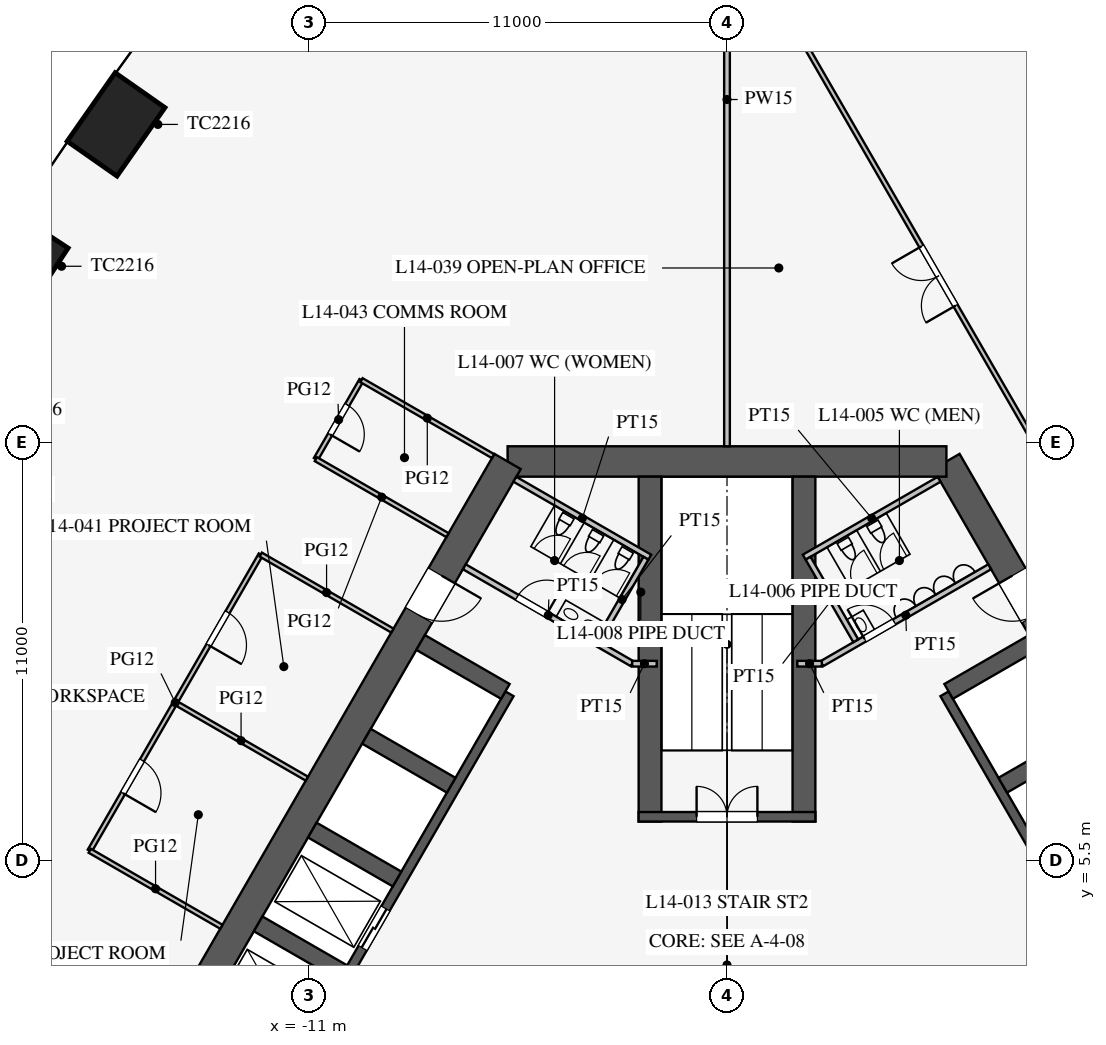
"""IFC4 building model, lengths in metres.
Left out: names, types, materials, properties, quantities, classifications, styles, units other than length and angle.
Written with IfcOpenShell. Run it as: python <this file> out.ifc"""

import sys

from ifc_helpers import new_model, si_unit, direction, frame, frame_2d, origin, origin_2d, place, context, subcontext, project, spatial, rectangle, extrude, element, fill, save


model = new_model("IFC4")
c1 = context("Model", 3, precision=1e-05, world=origin(), true_north=direction((0.0, 1.0)))
c2 = subcontext(c1, "Body", "Model", "MODEL_VIEW")
j1 = project(units=[si_unit("LENGTHUNIT", "METRE"), si_unit("PLANEANGLEUNIT", "RADIAN")], contexts=[c1])
p1 = place(None, origin())
s1 = spatial("IfcSite", under=j1, at=p1, CompositionType="ELEMENT")
p2 = place(p1, origin())
s2 = spatial("IfcBuilding", under=s1, at=p2, CompositionType="ELEMENT")
p3 = place(p2, frame((0.0, 0.0, 62.7)))
s3 = spatial("IfcBuildingStorey", under=s2, at=p3, CompositionType="ELEMENT", Elevation=62.7)
for number, where, z_axis, x_axis in (
    (1, (-16.076, 24.87, 0.0), (0.0, 0.0, 1.0), (-0.574, -0.819, 0.0)),
    (2, (-18.611, 21.137, 0.0), (0.0, 0.0, 1.0), (-0.549, -0.836, 0.0)),
):
    element("IfcColumn", number, at=place(p3, frame(where, z_axis=z_axis, x_axis=x_axis)), inside=s3, PredefinedType="COLUMN", context=c2, shape_type="SweptSolid", body=[
        extrude(rectangle(XDim=2.2, YDim=1.6, at=origin_2d()), origin(), (0.0, 0.0, 1.0), 4.2),
    ])
p4 = place(p3, frame((16.743, -3.0, 0.0), z_axis=(0.0, 0.0, 1.0), x_axis=(-0.500002442456, 0.866023993627, 0.0)))
e3 = element("IfcWall", 3, at=p4, inside=s3, PredefinedType="SHEAR", context=c2, shape_type="SweptSolid", body=[
    extrude(rectangle(XDim=21.939, YDim=0.8, at=frame_2d((10.97, 0.0))), origin(), (0.0, 0.0, 1.0), 4.2),
])
p5 = place(p4, frame((17.27, 0.0, 0.0)))
e4 = element("IfcOpeningElement", 4, at=p5, cuts=e3, PredefinedType="OPENING", context=c2, shape_type="SweptSolid", body=[
    extrude(rectangle(XDim=1.2, YDim=2.1, at=frame_2d((0.6, 1.05))), frame((0.0, 0.41, 0.0), z_axis=(0.0, -1.0, 0.0), x_axis=(1.0, 0.0, 0.0)), (0.0, 0.0, 1.0), 0.82),
])
p6 = place(p4, frame((3.47, 0.0, 0.0)))
e5 = element("IfcOpeningElement", 5, at=p6, cuts=e3, PredefinedType="OPENING", context=c2, shape_type="SweptSolid", body=[
    extrude(rectangle(XDim=1.2, YDim=2.1, at=frame_2d((0.6, 1.05))), frame((0.0, 0.41, 0.0), z_axis=(0.0, -1.0, 0.0), x_axis=(1.0, 0.0, 0.0)), (0.0, 0.0, 1.0), 0.82),
])
p7 = place(p3, frame((5.773, 16.0, 0.0), z_axis=(0.0, 0.0, 1.0), x_axis=(-1.0, 0.0, 0.0)))
e6 = element("IfcWall", 6, at=p7, inside=s3, PredefinedType="SHEAR", context=c2, shape_type="SweptSolid", body=[
    extrude(rectangle(XDim=11.547, YDim=0.8, at=frame_2d((5.773, 0.0))), origin(), (0.0, 0.0, 1.0), 4.2),
])
p8 = place(p3, frame((-5.773, 16.0, 0.0), z_axis=(0.0, 0.0, 1.0), x_axis=(-0.500002442456, -0.866023993627, 0.0)))
e7 = element("IfcWall", 7, at=p8, inside=s3, PredefinedType="SHEAR", context=c2, shape_type="SweptSolid", body=[
    extrude(rectangle(XDim=21.939, YDim=0.8, at=frame_2d((10.97, 0.0))), origin(), (0.0, 0.0, 1.0), 4.2),
])
p9 = place(p8, frame((17.27, 0.0, 0.0)))
e8 = element("IfcOpeningElement", 8, at=p9, cuts=e7, PredefinedType="OPENING", context=c2, shape_type="SweptSolid", body=[
    extrude(rectangle(XDim=1.2, YDim=2.1, at=frame_2d((0.6, 1.05))), frame((0.0, 0.41, 0.0), z_axis=(0.0, -1.0, 0.0), x_axis=(1.0, 0.0, 0.0)), (0.0, 0.0, 1.0), 0.82),
])
p10 = place(p8, frame((3.47, 0.0, 0.0)))
e9 = element("IfcOpeningElement", 9, at=p10, cuts=e7, PredefinedType="OPENING", context=c2, shape_type="SweptSolid", body=[
    extrude(rectangle(XDim=1.2, YDim=2.1, at=frame_2d((0.6, 1.05))), frame((0.0, 0.41, 0.0), z_axis=(0.0, -1.0, 0.0), x_axis=(1.0, 0.0, 0.0)), (0.0, 0.0, 1.0), 0.82),
])
p11 = place(p3, frame((11.424, 0.014, 0.0), z_axis=(0.0, 0.0, 1.0), x_axis=(-0.500001763848, 0.866024385424, 0.0)))
e10 = element("IfcWall", 10, at=p11, inside=s3, PredefinedType="SHEAR", context=c2, shape_type="SweptSolid", body=[
    extrude(rectangle(XDim=11.4, YDim=0.25, at=frame_2d((5.7, 0.0))), origin(), (0.0, 0.0, 1.0), 4.2),
])
p12 = place(p3, frame((7.257, 7.481, 0.0), z_axis=(0.0, 0.0, 1.0), x_axis=(0.866046643894, 0.499963209246, 0.0)))
e11 = element("IfcWall", 11, at=p12, inside=s3, PredefinedType="SHEAR", context=c2, shape_type="SweptSolid", body=[
    extrude(rectangle(XDim=2.575, YDim=0.45, at=frame_2d((1.288, 0.0))), origin(), (0.0, 0.0, 1.0), 4.2),
])
p13 = place(p3, frame((5.832, 9.949, 0.0), z_axis=(0.0, 0.0, 1.0), x_axis=(0.866029291668, 0.499993265928, 0.0)))
e12 = element("IfcWall", 12, at=p13, inside=s3, PredefinedType="SHEAR", context=c2, shape_type="SweptSolid", body=[
    extrude(rectangle(XDim=2.575, YDim=0.45, at=frame_2d((1.288, 0.0))), origin(), (0.0, 0.0, 1.0), 4.2),
])
p14 = place(p3, frame((-5.724, 9.886, 0.0), z_axis=(0.0, 0.0, 1.0), x_axis=(-0.500001763848, -0.866024385424, 0.0)))
e13 = element("IfcWall", 13, at=p14, inside=s3, PredefinedType="SHEAR", context=c2, shape_type="SweptSolid", body=[
    extrude(rectangle(XDim=11.4, YDim=0.25, at=frame_2d((5.7, 0.0))), origin(), (0.0, 0.0, 1.0), 4.2),
])
p15 = place(p14, frame((6.525, 0.0, 0.0)))
e14 = element("IfcOpeningElement", 14, at=p15, cuts=e13, PredefinedType="OPENING", context=c2, shape_type="SweptSolid", body=[
    extrude(rectangle(XDim=1.2, YDim=2.2, at=frame_2d((0.6, 1.1))), frame((0.0, 0.135, 0.0), z_axis=(0.0, -1.0, 0.0), x_axis=(1.0, 0.0, 0.0)), (0.0, 0.0, 1.0), 0.27),
])
p16 = place(p14, frame((9.375, 0.0, 0.0)))
e15 = element("IfcOpeningElement", 15, at=p16, cuts=e13, PredefinedType="OPENING", context=c2, shape_type="SweptSolid", body=[
    extrude(rectangle(XDim=1.2, YDim=2.2, at=frame_2d((0.6, 1.1))), frame((0.0, 0.135, 0.0), z_axis=(0.0, -1.0, 0.0), x_axis=(1.0, 0.0, 0.0)), (0.0, 0.0, 1.0), 0.27),
])
p17 = place(p3, frame((-5.832, 9.949, 0.0), z_axis=(0.0, 0.0, 1.0), x_axis=(-0.866029291668, 0.499993265928, 0.0)))
e16 = element("IfcWall", 16, at=p17, inside=s3, PredefinedType="SHEAR", context=c2, shape_type="SweptSolid", body=[
    extrude(rectangle(XDim=2.575, YDim=0.45, at=frame_2d((1.288, 0.0))), origin(), (0.0, 0.0, 1.0), 4.2),
])
for number, where, z_axis, x_axis in (
    (17, (-7.257, 7.481, 0.0), (0.0, 0.0, 1.0), (-0.866, 0.5, 0.0)),
    (18, (-8.682, 5.012, 0.0), (0.0, 0.0, 1.0), (-0.866, 0.5, 0.0)),
    (19, (-10.107, 2.544, 0.0), (0.0, 0.0, 1.0), (-0.866, 0.5, 0.0)),
):
    element("IfcWall", number, at=place(p3, frame(where, z_axis=z_axis, x_axis=x_axis)), inside=s3, PredefinedType="SHEAR", context=c2, shape_type="SweptSolid", body=[
        extrude(rectangle(XDim=2.575, YDim=0.45, at=frame_2d((1.288, 0.0))), origin(), (0.0, 0.0, 1.0), 4.2),
    ])
for number, where, z_axis, x_axis in (
    (20, (2.025, 6.525, 0.0), (0.0, 0.0, 1.0), (0.0, 1.0, 0.0)),
    (21, (-2.025, 6.525, 0.0), (0.0, 0.0, 1.0), (0.0, 1.0, 0.0)),
):
    element("IfcWall", number, at=place(p3, frame(where, z_axis=z_axis, x_axis=x_axis)), inside=s3, PredefinedType="SHEAR", context=c2, shape_type="SweptSolid", body=[
        extrude(rectangle(XDim=9.075, YDim=0.6, at=frame_2d((4.538, 0.0))), origin(), (0.0, 0.0, 1.0), 4.2),
    ])
p18 = place(p3, frame((2.325, 6.65, 0.0), z_axis=(0.0, 0.0, 1.0), x_axis=(-1.0, 0.0, 0.0)))
e22 = element("IfcWall", 22, at=p18, inside=s3, PredefinedType="SHEAR", context=c2, shape_type="SweptSolid", body=[
    extrude(rectangle(XDim=4.65, YDim=0.25, at=frame_2d((2.325, 0.0))), origin(), (0.0, 0.0, 1.0), 4.2),
])
p19 = place(p18, frame((1.525, 0.0, 0.0)))
e23 = element("IfcOpeningElement", 23, at=p19, cuts=e22, PredefinedType="OPENING", context=c2, shape_type="SweptSolid", body=[
    extrude(rectangle(XDim=1.6, YDim=2.1, at=frame_2d((0.8, 1.05))), frame((0.0, 0.135, 0.0), z_axis=(0.0, -1.0, 0.0), x_axis=(1.0, 0.0, 0.0)), (0.0, 0.0, 1.0), 0.27),
])
p20 = place(p3, frame((2.495, 10.678, 0.0), z_axis=(0.0, 0.0, 1.0), x_axis=(0.86602216432, 0.500005610874, 0.0)))
e24 = element("IfcWall", 24, at=p20, inside=s3, PredefinedType="PARTITIONING", context=c2, shape_type="SweptSolid", body=[
    extrude(rectangle(XDim=5.1, YDim=0.15, at=frame_2d((2.55, 0.0))), origin(), (0.0, 0.0, 1.0), 4.0),
])
p21 = place(p20, frame((1.3, 0.0, 0.0)))
e25 = element("IfcOpeningElement", 25, at=p21, cuts=e24, PredefinedType="OPENING", context=c2, shape_type="SweptSolid", body=[
    extrude(rectangle(XDim=0.9, YDim=2.1, at=frame_2d((0.45, 1.05))), frame((0.0, 0.085, 0.0), z_axis=(0.0, -1.0, 0.0), x_axis=(1.0, 0.0, 0.0)), (0.0, 0.0, 1.0), 0.17),
])
p22 = place(p3, frame((-2.495, 10.678, 0.0), z_axis=(0.0, 0.0, 1.0), x_axis=(-0.86602216432, 0.500005610874, 0.0)))
e26 = element("IfcWall", 26, at=p22, inside=s3, PredefinedType="PARTITIONING", context=c2, shape_type="SweptSolid", body=[
    extrude(rectangle(XDim=5.1, YDim=0.15, at=frame_2d((2.55, 0.0))), origin(), (0.0, 0.0, 1.0), 4.0),
])
p23 = place(p22, frame((2.6, 0.0, 0.0)))
e27 = element("IfcOpeningElement", 27, at=p23, cuts=e26, PredefinedType="OPENING", context=c2, shape_type="SweptSolid", body=[
    extrude(rectangle(XDim=0.9, YDim=2.1, at=frame_2d((0.45, 1.05))), frame((0.0, 0.085, 0.0), z_axis=(0.0, -1.0, 0.0), x_axis=(1.0, 0.0, 0.0)), (0.0, 0.0, 1.0), 0.17),
])
for number, where, z_axis, x_axis in (
    (28, (2.495, 10.678, 0.0), (0.0, 0.0, 1.0), (-1.0, 0.0, 0.0)),
    (29, (-2.495, 10.678, 0.0), (0.0, 0.0, 1.0), (1.0, 0.0, 0.0)),
):
    element("IfcWall", number, at=place(p3, frame(where, z_axis=z_axis, x_axis=x_axis)), inside=s3, PredefinedType="PARTITIONING", context=c2, shape_type="SweptSolid", body=[
        extrude(rectangle(XDim=0.645, YDim=0.15, at=frame_2d((0.323, 0.0))), origin(), (0.0, 0.0, 1.0), 4.0),
    ])
p24 = place(p3, frame((2.031, 13.482, 0.0), z_axis=(0.0, 0.0, 1.0), x_axis=(0.866050731258, 0.499956128963, 0.0)))
e30 = element("IfcWall", 30, at=p24, inside=s3, PredefinedType="PARTITIONING", context=c2, shape_type="SweptSolid", body=[
    extrude(rectangle(XDim=4.1, YDim=0.15, at=frame_2d((2.05, 0.0))), origin(), (0.0, 0.0, 1.0), 4.0),
])
p25 = place(p3, frame((3.389, 11.281, 0.0), z_axis=(0.0, 0.0, 1.0), x_axis=(-0.499989096993, 0.866031698547, 0.0)))
e31 = element("IfcWall", 31, at=p25, inside=s3, PredefinedType="PARTITIONING", context=c2, shape_type="SweptSolid", body=[
    extrude(rectangle(XDim=2.51, YDim=0.15, at=frame_2d((1.255, 0.0))), origin(), (0.0, 0.0, 1.0), 4.0),
])
p26 = place(p3, frame((-2.031, 13.482, 0.0), z_axis=(0.0, 0.0, 1.0), x_axis=(-0.866050731258, 0.499956128963, 0.0)))
e32 = element("IfcWall", 32, at=p26, inside=s3, PredefinedType="PARTITIONING", context=c2, shape_type="SweptSolid", body=[
    extrude(rectangle(XDim=4.1, YDim=0.15, at=frame_2d((2.05, 0.0))), origin(), (0.0, 0.0, 1.0), 4.0),
])
p27 = place(p3, frame((-3.389, 11.281, 0.0), z_axis=(0.0, 0.0, 1.0), x_axis=(0.499989096993, 0.866031698547, 0.0)))
e33 = element("IfcWall", 33, at=p27, inside=s3, PredefinedType="PARTITIONING", context=c2, shape_type="SweptSolid", body=[
    extrude(rectangle(XDim=2.51, YDim=0.15, at=frame_2d((1.255, 0.0))), origin(), (0.0, 0.0, 1.0), 4.0),
])
p28 = place(p3, frame((0.0, 16.4, 0.0), z_axis=(0.0, 0.0, 1.0), x_axis=(0.0, 1.0, 0.0)))
e34 = element("IfcWall", 34, at=p28, inside=s3, PredefinedType="PARTITIONING", context=c2, shape_type="SweptSolid", body=[
    extrude(rectangle(XDim=18.25, YDim=0.15, at=frame_2d((9.125, 0.0))), origin(), (0.0, 0.0, 1.0), 2.3),
])
p29 = place(p3, frame((26.415, -15.231, 0.0), z_axis=(0.0, 0.0, 1.0), x_axis=(-0.50000091641, 0.866024874695, 0.0)))
e35 = element("IfcWall", 35, at=p29, inside=s3, PredefinedType="PARTITIONING", context=c2, shape_type="SweptSolid", body=[
    extrude(rectangle(XDim=52.796, YDim=0.12, at=frame_2d((26.398, 0.0))), origin(), (0.0, 0.0, 1.0), 2.9),
])
p30 = place(p29, frame((10.2, 0.0, 0.15)))
e36 = element("IfcOpeningElement", 36, at=p30, cuts=e35, PredefinedType="OPENING", context=c2, shape_type="SweptSolid", body=[
    extrude(rectangle(XDim=1.8, YDim=2.1, at=frame_2d((0.9, 1.05))), frame((0.0, 0.07, 0.0), z_axis=(0.0, -1.0, 0.0), x_axis=(1.0, 0.0, 0.0)), (0.0, 0.0, 1.0), 0.14),
])
p31 = place(p29, frame((40.8, 0.0, 0.15)))
e37 = element("IfcOpeningElement", 37, at=p31, cuts=e35, PredefinedType="OPENING", context=c2, shape_type="SweptSolid", body=[
    extrude(rectangle(XDim=1.8, YDim=2.1, at=frame_2d((0.9, 1.05))), frame((0.0, 0.07, 0.0), z_axis=(0.0, -1.0, 0.0), x_axis=(1.0, 0.0, 0.0)), (0.0, 0.0, 1.0), 0.14),
])
p32 = place(p3, frame((9.793, 26.439, 0.0), z_axis=(0.0, 0.0, 1.0), x_axis=(-0.608784932975, 0.79333530451, 0.0)))
e38 = element("IfcWall", 38, at=p32, inside=s3, PredefinedType="PARTITIONING", context=c2, shape_type="SweptSolid", body=[
    extrude(rectangle(XDim=4.539, YDim=0.12, at=frame_2d((2.27, 0.0))), origin(), (0.0, 0.0, 1.0), 2.9),
])
p33 = place(p3, frame((-14.519, 9.653, 0.0), z_axis=(0.0, 0.0, 1.0), x_axis=(-0.500013631625, -0.866017533419, 0.0)))
e39 = element("IfcWall", 39, at=p33, inside=s3, PredefinedType="PARTITIONING", context=c2, shape_type="SweptSolid", body=[
    extrude(rectangle(XDim=4.5, YDim=0.12, at=frame_2d((2.25, 0.0))), origin(), (0.0, 0.0, 1.0), 2.9),
])
p34 = place(p33, frame((1.75, 0.0, 0.15)))
e40 = element("IfcOpeningElement", 40, at=p34, cuts=e39, PredefinedType="OPENING", context=c2, shape_type="SweptSolid", body=[
    extrude(rectangle(XDim=1.0, YDim=2.1, at=frame_2d((0.5, 1.05))), frame((0.0, 0.07, 0.0), z_axis=(0.0, -1.0, 0.0), x_axis=(1.0, 0.0, 0.0)), (0.0, 0.0, 1.0), 0.14),
])
p35 = place(p3, frame((-9.619, 18.14, 0.0), z_axis=(0.0, 0.0, 1.0), x_axis=(-0.500001309137, -0.866024647952, 0.0)))
e41 = element("IfcWall", 41, at=p35, inside=s3, PredefinedType="PARTITIONING", context=c2, shape_type="SweptSolid", body=[
    extrude(rectangle(XDim=2.4, YDim=0.12, at=frame_2d((1.2, 0.0))), origin(), (0.0, 0.0, 1.0), 2.9),
])
p36 = place(p35, frame((0.75, 0.0, 0.15)))
e42 = element("IfcOpeningElement", 42, at=p36, cuts=e41, PredefinedType="OPENING", context=c2, shape_type="SweptSolid", body=[
    extrude(rectangle(XDim=0.9, YDim=2.1, at=frame_2d((0.45, 1.05))), frame((0.0, 0.07, 0.0), z_axis=(0.0, -1.0, 0.0), x_axis=(1.0, 0.0, 0.0)), (0.0, 0.0, 1.0), 0.14),
])
p37 = place(p3, frame((-12.269, 13.55, 0.0), z_axis=(0.0, 0.0, 1.0), x_axis=(-0.499990139034, -0.866031096941, 0.0)))
e43 = element("IfcWall", 43, at=p37, inside=s3, PredefinedType="PARTITIONING", context=c2, shape_type="SweptSolid", body=[
    extrude(rectangle(XDim=4.5, YDim=0.12, at=frame_2d((2.25, 0.0))), origin(), (0.0, 0.0, 1.0), 2.9),
])
p38 = place(p37, frame((1.75, 0.0, 0.15)))
e44 = element("IfcOpeningElement", 44, at=p38, cuts=e43, PredefinedType="OPENING", context=c2, shape_type="SweptSolid", body=[
    extrude(rectangle(XDim=1.0, YDim=2.1, at=frame_2d((0.5, 1.05))), frame((0.0, 0.07, 0.0), z_axis=(0.0, -1.0, 0.0), x_axis=(1.0, 0.0, 0.0)), (0.0, 0.0, 1.0), 0.14),
])
for number, where, z_axis, x_axis in (
    (45, (-13.305, 3.756, 0.0), (0.0, 0.0, 1.0), (-0.866, 0.5, 0.0)),
    (46, (-11.055, 7.653, 0.0), (0.0, 0.0, 1.0), (-0.866, 0.5, 0.0)),
    (47, (-6.155, 16.14, 0.0), (0.0, 0.0, 1.0), (-0.866, 0.5, 0.0)),
    (48, (-8.805, 11.55, 0.0), (0.0, 0.0, 1.0), (-0.866, 0.5, 0.0)),
    (49, (-7.355, 14.061, 0.0), (0.0, 0.0, 1.0), (-0.866, 0.5, 0.0)),
):
    element("IfcWall", number, at=place(p3, frame(where, z_axis=z_axis, x_axis=x_axis)), inside=s3, PredefinedType="PARTITIONING", context=c2, shape_type="SweptSolid", body=[
        extrude(rectangle(XDim=4.0, YDim=0.12, at=frame_2d((2.0, 0.0))), origin(), (0.0, 0.0, 1.0), 2.9),
    ])
p39 = place(p21, origin())
e50 = element("IfcDoor", 50, at=p39, inside=s3, OperationType="SINGLE_SWING_LEFT", PredefinedType="DOOR", context=c2, shape_type="SweptSolid", body=[
    extrude(rectangle(XDim=0.9, YDim=2.1, at=frame_2d((0.45, 1.05))), frame((0.0, 0.025, 0.0), z_axis=(0.0, -1.0, 0.0), x_axis=(1.0, 0.0, 0.0)), (0.0, 0.0, 1.0), 0.05),
])
fill(e25, e50)
p40 = place(p23, frame((0.9, 0.0, 0.0), z_axis=(0.0, 0.0, 1.0), x_axis=(-1.0, 0.0, 0.0)))
e51 = element("IfcDoor", 51, at=p40, inside=s3, OperationType="SINGLE_SWING_RIGHT", PredefinedType="DOOR", context=c2, shape_type="SweptSolid", body=[
    extrude(rectangle(XDim=0.9, YDim=2.1, at=frame_2d((0.45, 1.05))), frame((0.0, 0.025, 0.0), z_axis=(0.0, -1.0, 0.0), x_axis=(1.0, 0.0, 0.0)), (0.0, 0.0, 1.0), 0.05),
])
fill(e27, e51)
p41 = place(p19, frame((1.6, 0.0, 0.0), z_axis=(0.0, 0.0, 1.0), x_axis=(-1.0, 0.0, 0.0)))
e52 = element("IfcDoor", 52, at=p41, inside=s3, OperationType="DOUBLE_DOOR_SINGLE_SWING", PredefinedType="DOOR", context=c2, shape_type="SweptSolid", body=[
    extrude(rectangle(XDim=1.6, YDim=2.1, at=frame_2d((0.8, 1.05))), frame((0.0, 0.025, 0.0), z_axis=(0.0, -1.0, 0.0), x_axis=(1.0, 0.0, 0.0)), (0.0, 0.0, 1.0), 0.05),
])
fill(e23, e52)
p42 = place(p5, origin())
e53 = element("IfcDoor", 53, at=p42, inside=s3, OperationType="SINGLE_SWING_RIGHT", PredefinedType="DOOR", context=c2, shape_type="SweptSolid", body=[
    extrude(rectangle(XDim=1.2, YDim=2.1, at=frame_2d((0.6, 1.05))), frame((0.0, 0.025, 0.0), z_axis=(0.0, -1.0, 0.0), x_axis=(1.0, 0.0, 0.0)), (0.0, 0.0, 1.0), 0.05),
])
fill(e4, e53)
p43 = place(p10, origin())
e54 = element("IfcDoor", 54, at=p43, inside=s3, OperationType="SINGLE_SWING_LEFT", PredefinedType="DOOR", context=c2, shape_type="SweptSolid", body=[
    extrude(rectangle(XDim=1.2, YDim=2.1, at=frame_2d((0.6, 1.05))), frame((0.0, 0.025, 0.0), z_axis=(0.0, -1.0, 0.0), x_axis=(1.0, 0.0, 0.0)), (0.0, 0.0, 1.0), 0.05),
])
fill(e9, e54)
p44 = place(p31, origin())
e55 = element("IfcDoor", 55, at=p44, inside=s3, OperationType="DOUBLE_DOOR_SINGLE_SWING", PredefinedType="DOOR", context=c2, shape_type="SweptSolid", body=[
    extrude(rectangle(XDim=1.8, YDim=2.1, at=frame_2d((0.9, 1.05))), frame((0.0, 0.025, 0.0), z_axis=(0.0, -1.0, 0.0), x_axis=(1.0, 0.0, 0.0)), (0.0, 0.0, 1.0), 0.05),
])
fill(e37, e55)
p45 = place(p38, origin())
e56 = element("IfcDoor", 56, at=p45, inside=s3, OperationType="SINGLE_SWING_RIGHT", PredefinedType="DOOR", context=c2, shape_type="SweptSolid", body=[
    extrude(rectangle(XDim=1.0, YDim=2.1, at=frame_2d((0.5, 1.05))), frame((0.0, 0.025, 0.0), z_axis=(0.0, -1.0, 0.0), x_axis=(1.0, 0.0, 0.0)), (0.0, 0.0, 1.0), 0.05),
])
fill(e44, e56)
p46 = place(p34, origin())
e57 = element("IfcDoor", 57, at=p46, inside=s3, OperationType="SINGLE_SWING_RIGHT", PredefinedType="DOOR", context=c2, shape_type="SweptSolid", body=[
    extrude(rectangle(XDim=1.0, YDim=2.1, at=frame_2d((0.5, 1.05))), frame((0.0, 0.025, 0.0), z_axis=(0.0, -1.0, 0.0), x_axis=(1.0, 0.0, 0.0)), (0.0, 0.0, 1.0), 0.05),
])
fill(e40, e57)
p47 = place(p36, origin())
e58 = element("IfcDoor", 58, at=p47, inside=s3, OperationType="SINGLE_SWING_RIGHT", PredefinedType="DOOR", context=c2, shape_type="SweptSolid", body=[
    extrude(rectangle(XDim=0.9, YDim=2.1, at=frame_2d((0.45, 1.05))), frame((0.0, 0.025, 0.0), z_axis=(0.0, -1.0, 0.0), x_axis=(1.0, 0.0, 0.0)), (0.0, 0.0, 1.0), 0.05),
])
fill(e42, e58)
p48 = place(p15, origin())
e59 = element("IfcDoor", 59, at=p48, inside=s3, OperationType="DOUBLE_DOOR_SLIDING", PredefinedType="DOOR", context=c2, shape_type="SweptSolid", body=[
    extrude(rectangle(XDim=1.2, YDim=2.2, at=frame_2d((0.6, 1.1))), frame((0.0, 0.025, 0.0), z_axis=(0.0, -1.0, 0.0), x_axis=(1.0, 0.0, 0.0)), (0.0, 0.0, 1.0), 0.05),
])
fill(e14, e59)
save(model, sys.argv[1])
